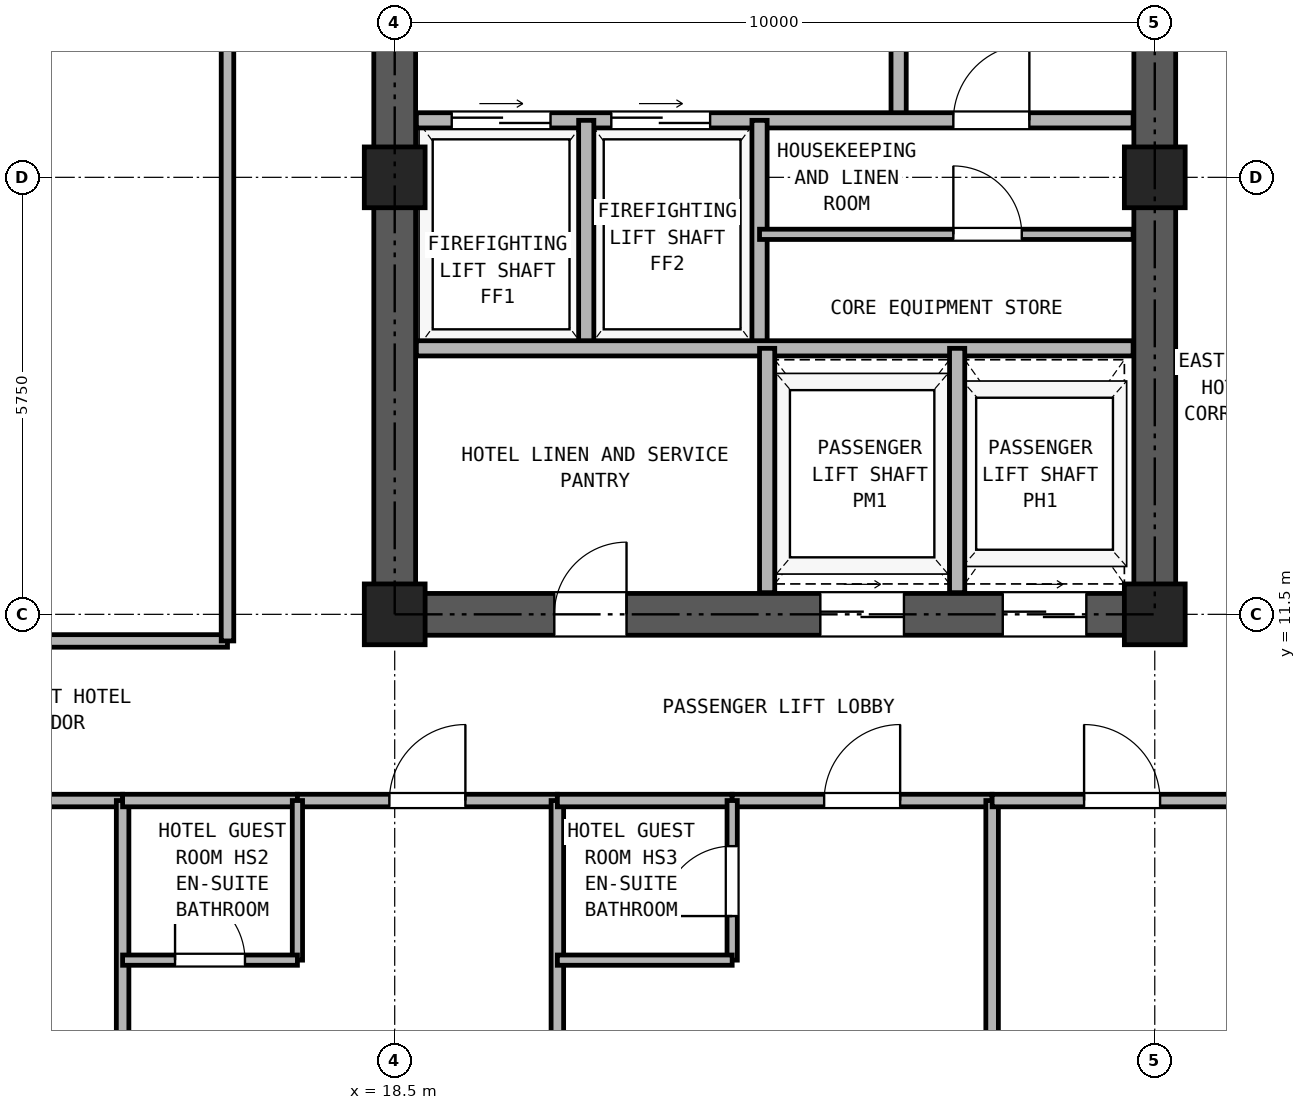
"""IFC4 building model, lengths in metres.
Left out: names, types, materials, properties, quantities, classifications, styles, units other than length and angle.
Written with IfcOpenShell. Run it as: python <this file> out.ifc"""

import sys

from ifc_helpers import new_model, si_unit, direction, frame, frame_2d, origin, origin_2d, place, context, subcontext, project, spatial, rectangle, hollow_rectangle, extrude, source, transform, mapped, element, fill, save


model = new_model("IFC4")
c1 = context("Model", 3, precision=1e-05, world=origin(), true_north=direction((0.0, 1.0)))
c2 = subcontext(c1, "Body", "Model", "MODEL_VIEW")
j1 = project(units=[si_unit("LENGTHUNIT", "METRE"), si_unit("PLANEANGLEUNIT", "RADIAN")], contexts=[c1])
p1 = place(None, origin())
s1 = spatial("IfcSite", under=j1, at=p1, CompositionType="ELEMENT")
p2 = place(p1, origin())
s2 = spatial("IfcBuilding", under=s1, at=p2, CompositionType="ELEMENT")
p3 = place(p2, frame((0.0, 0.0, 99.1)))
s3 = spatial("IfcBuildingStorey", under=s2, at=p3, CompositionType="ELEMENT", Elevation=99.1)
m1 = source(origin(), c2, "Body", "SweptSolid", [
    extrude(hollow_rectangle(XDim=0.8, YDim=0.8, WallThickness=0.045, at=origin_2d()), origin(), (0.0, 0.0, 1.0), 2.95),
])
for number, where, z_axis, x_axis in (
    (1, (18.5, 11.5, 0.0), (0.0, 0.0, 1.0), (1.0, 0.0, 0.0)),
    (2, (18.5, 17.25, 0.0), (0.0, 0.0, 1.0), (1.0, 0.0, 0.0)),
    (3, (28.5, 11.5, 0.0), (0.0, 0.0, 1.0), (1.0, 0.0, 0.0)),
    (4, (28.5, 17.25, 0.0), (0.0, 0.0, 1.0), (1.0, 0.0, 0.0)),
):
    element("IfcColumn", number, at=place(p3, frame(where, z_axis=z_axis, x_axis=x_axis)), inside=s3, PredefinedType="COLUMN", context=c2, shape_type="MappedRepresentation", body=[
        mapped(m1, transform((0.0, 0.0, 0.0), x_axis=(1.0, 0.0, 0.0), y_axis=(0.0, 1.0, 0.0), z_axis=(0.0, 0.0, 1.0), scale=1.0)),
    ])
p4 = place(p3, frame((18.225, 11.5, 0.0), z_axis=(0.0, 0.0, 1.0), x_axis=(1.0, 0.0, 0.0)))
e5 = element("IfcWall", 5, at=p4, inside=s3, PredefinedType="SHEAR", context=c2, shape_type="SweptSolid", body=[
    extrude(rectangle(XDim=10.55, YDim=0.55, at=frame_2d((5.275, 0.0))), origin(), (0.0, 0.0, 1.0), 2.95),
])
p5 = place(p4, frame((2.375, 0.0, 0.0)))
e6 = element("IfcOpeningElement", 6, at=p5, cuts=e5, PredefinedType="OPENING", context=c2, shape_type="SweptSolid", body=[
    extrude(rectangle(XDim=0.95, YDim=2.15, at=frame_2d((0.475, 1.075))), frame((0.0, 0.285, 0.0), z_axis=(0.0, -1.0, 0.0), x_axis=(1.0, 0.0, 0.0)), (0.0, 0.0, 1.0), 0.57),
])
p6 = place(p4, frame((5.875, 0.0, 0.0)))
e7 = element("IfcOpeningElement", 7, at=p6, cuts=e5, PredefinedType="OPENING", context=c2, shape_type="SweptSolid", body=[
    extrude(rectangle(XDim=1.1, YDim=2.25, at=frame_2d((0.55, 1.125))), frame((0.0, 0.285, 0.0), z_axis=(0.0, -1.0, 0.0), x_axis=(1.0, 0.0, 0.0)), (0.0, 0.0, 1.0), 0.57),
])
p7 = place(p4, frame((8.275, 0.0, 0.0)))
e8 = element("IfcOpeningElement", 8, at=p7, cuts=e5, PredefinedType="OPENING", context=c2, shape_type="SweptSolid", body=[
    extrude(rectangle(XDim=1.1, YDim=2.25, at=frame_2d((0.55, 1.125))), frame((0.0, 0.285, 0.0), z_axis=(0.0, -1.0, 0.0), x_axis=(1.0, 0.0, 0.0)), (0.0, 0.0, 1.0), 0.57),
])
p8 = place(p3, frame((18.5, 11.775, 0.0), z_axis=(0.0, 0.0, 1.0), x_axis=(0.0, 1.0, 0.0)))
e9 = element("IfcWall", 9, at=p8, inside=s3, PredefinedType="SHEAR", context=c2, shape_type="SweptSolid", body=[
    extrude(rectangle(XDim=16.7, YDim=0.55, at=frame_2d((8.35, 0.0))), origin(), (0.0, 0.0, 1.0), 2.95),
])
p9 = place(p8, frame((7.375, 0.0, 0.0)))
e10 = element("IfcOpeningElement", 10, at=p9, cuts=e9, PredefinedType="OPENING", context=c2, shape_type="SweptSolid", body=[
    extrude(rectangle(XDim=1.15, YDim=2.2, at=frame_2d((0.575, 1.1))), frame((0.0, 0.285, 0.0), z_axis=(0.0, -1.0, 0.0), x_axis=(1.0, 0.0, 0.0)), (0.0, 0.0, 1.0), 0.57),
])
p10 = place(p3, frame((28.5, 11.775, 0.0), z_axis=(0.0, 0.0, 1.0), x_axis=(0.0, 1.0, 0.0)))
e11 = element("IfcWall", 11, at=p10, inside=s3, PredefinedType="SHEAR", context=c2, shape_type="SweptSolid", body=[
    extrude(rectangle(XDim=16.7, YDim=0.55, at=frame_2d((8.35, 0.0))), origin(), (0.0, 0.0, 1.0), 2.95),
])
p11 = place(p10, frame((7.375, 0.0, 0.0)))
e12 = element("IfcOpeningElement", 12, at=p11, cuts=e11, PredefinedType="OPENING", context=c2, shape_type="SweptSolid", body=[
    extrude(rectangle(XDim=1.15, YDim=2.2, at=frame_2d((0.575, 1.1))), frame((0.0, 0.285, 0.0), z_axis=(0.0, -1.0, 0.0), x_axis=(1.0, 0.0, 0.0)), (0.0, 0.0, 1.0), 0.57),
])
p12 = place(p3, frame((25.13, 18.0, 0.0), z_axis=(0.0, 0.0, 1.0), x_axis=(0.0, 1.0, 0.0)))
e13 = element("IfcWall", 13, at=p12, inside=s3, PredefinedType="PARTITIONING", context=c2, shape_type="SweptSolid", body=[
    extrude(rectangle(XDim=3.39, YDim=0.2, at=frame_2d((1.695, 0.0))), origin(), (0.0, 0.0, 1.0), 2.95),
])
p13 = place(p12, frame((1.1, 0.0, 0.0)))
e14 = element("IfcOpeningElement", 14, at=p13, cuts=e13, PredefinedType="OPENING", context=c2, shape_type="SweptSolid", body=[
    extrude(rectangle(XDim=1.15, YDim=2.2, at=frame_2d((0.575, 1.1))), frame((0.0, 0.11, 0.0), z_axis=(0.0, -1.0, 0.0), x_axis=(1.0, 0.0, 0.0)), (0.0, 0.0, 1.0), 0.22),
])
p14 = place(p3, frame((18.785, 18.0, 0.0), z_axis=(0.0, 0.0, 1.0), x_axis=(1.0, 0.0, 0.0)))
e15 = element("IfcWall", 15, at=p14, inside=s3, PredefinedType="PARTITIONING", context=c2, shape_type="SweptSolid", body=[
    extrude(rectangle(XDim=9.43, YDim=0.2, at=frame_2d((4.715, 0.0))), origin(), (0.0, 0.0, 1.0), 2.95),
])
p15 = place(p14, frame((0.465, 0.0, 0.0)))
e16 = element("IfcOpeningElement", 16, at=p15, cuts=e15, PredefinedType="OPENING", context=c2, shape_type="SweptSolid", body=[
    extrude(rectangle(XDim=1.3, YDim=2.3, at=frame_2d((0.65, 1.15))), frame((0.0, 0.11, 0.0), z_axis=(0.0, -1.0, 0.0), x_axis=(1.0, 0.0, 0.0)), (0.0, 0.0, 1.0), 0.22),
])
p16 = place(p14, frame((2.565, 0.0, 0.0)))
e17 = element("IfcOpeningElement", 17, at=p16, cuts=e15, PredefinedType="OPENING", context=c2, shape_type="SweptSolid", body=[
    extrude(rectangle(XDim=1.3, YDim=2.3, at=frame_2d((0.65, 1.15))), frame((0.0, 0.11, 0.0), z_axis=(0.0, -1.0, 0.0), x_axis=(1.0, 0.0, 0.0)), (0.0, 0.0, 1.0), 0.22),
])
p17 = place(p14, frame((7.065, 0.0, 0.0)))
e18 = element("IfcOpeningElement", 18, at=p17, cuts=e15, PredefinedType="OPENING", context=c2, shape_type="SweptSolid", body=[
    extrude(rectangle(XDim=1.0, YDim=2.15, at=frame_2d((0.5, 1.075))), frame((0.0, 0.11, 0.0), z_axis=(0.0, -1.0, 0.0), x_axis=(1.0, 0.0, 0.0)), (0.0, 0.0, 1.0), 0.22),
])
for number, where, z_axis, x_axis in (
    (19, (21.02, 15.0, 0.0), (0.0, 0.0, 1.0), (0.0, 1.0, 0.0)),
    (20, (23.3, 15.0, 0.0), (0.0, 0.0, 1.0), (0.0, 1.0, 0.0)),
):
    element("IfcWall", number, at=place(p3, frame(where, z_axis=z_axis, x_axis=x_axis)), inside=s3, PredefinedType="PARTITIONING", context=c2, shape_type="SweptSolid", body=[
        extrude(rectangle(XDim=3.0, YDim=0.2, at=frame_2d((1.5, 0.0))), origin(), (0.0, 0.0, 1.0), 2.95),
    ])
p18 = place(p3, frame((18.785, 15.0, 0.0), z_axis=(0.0, 0.0, 1.0), x_axis=(1.0, 0.0, 0.0)))
e21 = element("IfcWall", 21, at=p18, inside=s3, PredefinedType="PARTITIONING", context=c2, shape_type="SweptSolid", body=[
    extrude(rectangle(XDim=9.43, YDim=0.2, at=frame_2d((4.715, 0.0))), origin(), (0.0, 0.0, 1.0), 2.95),
])
p19 = place(p3, frame((23.3, 16.5, 0.0), z_axis=(0.0, 0.0, 1.0), x_axis=(1.0, 0.0, 0.0)))
e22 = element("IfcWall", 22, at=p19, inside=s3, PredefinedType="PARTITIONING", context=c2, shape_type="SweptSolid", body=[
    extrude(rectangle(XDim=4.915, YDim=0.135, at=frame_2d((2.458, 0.0))), origin(), (0.0, 0.0, 1.0), 2.95),
])
p20 = place(p19, frame((2.55, 0.0, 0.0)))
e23 = element("IfcOpeningElement", 23, at=p20, cuts=e22, PredefinedType="OPENING", context=c2, shape_type="SweptSolid", body=[
    extrude(rectangle(XDim=0.9, YDim=2.05, at=frame_2d((0.45, 1.025))), frame((0.0, 0.077, 0.0), z_axis=(0.0, -1.0, 0.0), x_axis=(1.0, 0.0, 0.0)), (0.0, 0.0, 1.0), 0.155),
])
for number, where, z_axis, x_axis in (
    (24, (23.4, 11.785, 0.0), (0.0, 0.0, 1.0), (0.0, 1.0, 0.0)),
    (25, (25.9, 11.785, 0.0), (0.0, 0.0, 1.0), (0.0, 1.0, 0.0)),
):
    element("IfcWall", number, at=place(p3, frame(where, z_axis=z_axis, x_axis=x_axis)), inside=s3, PredefinedType="PARTITIONING", context=c2, shape_type="SweptSolid", body=[
        extrude(rectangle(XDim=3.215, YDim=0.2, at=frame_2d((1.607, 0.0))), origin(), (0.0, 0.0, 1.0), 2.95),
    ])
p21 = place(p3, frame((9.2, 11.15, 0.0), z_axis=(0.0, 0.0, 1.0), x_axis=(1.0, 0.0, 0.0)))
e26 = element("IfcWall", 26, at=p21, inside=s3, PredefinedType="PARTITIONING", context=c2, shape_type="SweptSolid", body=[
    extrude(rectangle(XDim=7.1, YDim=0.165, at=frame_2d((3.55, 0.0))), origin(), (0.0, 0.0, 1.0), 2.95),
])
p22 = place(p3, frame((16.3, 11.15, 0.0), z_axis=(0.0, 0.0, 1.0), x_axis=(0.0, 1.0, 0.0)))
e27 = element("IfcWall", 27, at=p22, inside=s3, PredefinedType="PARTITIONING", context=c2, shape_type="SweptSolid", body=[
    extrude(rectangle(XDim=18.6, YDim=0.165, at=frame_2d((9.3, 0.0))), origin(), (0.0, 0.0, 1.0), 2.95),
])
p23 = place(p22, frame((8.8, 0.0, 0.0)))
e28 = element("IfcOpeningElement", 28, at=p23, cuts=e27, PredefinedType="OPENING", context=c2, shape_type="SweptSolid", body=[
    extrude(rectangle(XDim=0.95, YDim=2.15, at=frame_2d((0.475, 1.075))), frame((0.0, 0.093, 0.0), z_axis=(0.0, -1.0, 0.0), x_axis=(1.0, 0.0, 0.0)), (0.0, 0.0, 1.0), 0.185),
])
p24 = place(p3, frame((11.5, 9.05, 0.0), z_axis=(0.0, 0.0, 1.0), x_axis=(1.0, 0.0, 0.0)))
e29 = element("IfcWall", 29, at=p24, inside=s3, PredefinedType="PARTITIONING", context=c2, shape_type="SweptSolid", body=[
    extrude(rectangle(XDim=3.42, YDim=0.165, at=frame_2d((1.71, 0.0))), origin(), (0.0, 0.0, 1.0), 2.95),
])
p25 = place(p24, frame((1.21, 0.0, 0.0)))
e30 = element("IfcOpeningElement", 30, at=p25, cuts=e29, PredefinedType="OPENING", context=c2, shape_type="SweptSolid", body=[
    extrude(rectangle(XDim=1.0, YDim=2.15, at=frame_2d((0.5, 1.075))), frame((0.0, 0.093, 0.0), z_axis=(0.0, -1.0, 0.0), x_axis=(1.0, 0.0, 0.0)), (0.0, 0.0, 1.0), 0.185),
])
p26 = place(p3, frame((14.92, 0.16, 0.0), z_axis=(0.0, 0.0, 1.0), x_axis=(0.0, 1.0, 0.0)))
e31 = element("IfcWall", 31, at=p26, inside=s3, PredefinedType="PARTITIONING", context=c2, shape_type="SweptSolid", body=[
    extrude(rectangle(XDim=8.89, YDim=0.165, at=frame_2d((4.445, 0.0))), origin(), (0.0, 0.0, 1.0), 2.95),
])
p27 = place(p3, frame((14.92, 9.05, 0.0), z_axis=(0.0, 0.0, 1.0), x_axis=(1.0, 0.0, 0.0)))
e32 = element("IfcWall", 32, at=p27, inside=s3, PredefinedType="PARTITIONING", context=c2, shape_type="SweptSolid", body=[
    extrude(rectangle(XDim=2.3, YDim=0.165, at=frame_2d((1.15, 0.0))), origin(), (0.0, 0.0, 1.0), 2.95),
])
p28 = place(p3, frame((17.22, 9.05, 0.0), z_axis=(0.0, 0.0, 1.0), x_axis=(1.0, 0.0, 0.0)))
e33 = element("IfcWall", 33, at=p28, inside=s3, PredefinedType="PARTITIONING", context=c2, shape_type="SweptSolid", body=[
    extrude(rectangle(XDim=3.42, YDim=0.165, at=frame_2d((1.71, 0.0))), origin(), (0.0, 0.0, 1.0), 2.95),
])
p29 = place(p28, frame((1.21, 0.0, 0.0)))
e34 = element("IfcOpeningElement", 34, at=p29, cuts=e33, PredefinedType="OPENING", context=c2, shape_type="SweptSolid", body=[
    extrude(rectangle(XDim=1.0, YDim=2.15, at=frame_2d((0.5, 1.075))), frame((0.0, 0.093, 0.0), z_axis=(0.0, -1.0, 0.0), x_axis=(1.0, 0.0, 0.0)), (0.0, 0.0, 1.0), 0.185),
])
p30 = place(p3, frame((17.22, 6.95, 0.0), z_axis=(0.0, 0.0, 1.0), x_axis=(0.0, 1.0, 0.0)))
e35 = element("IfcWall", 35, at=p30, inside=s3, PredefinedType="PARTITIONING", context=c2, shape_type="SweptSolid", body=[
    extrude(rectangle(XDim=2.1, YDim=0.135, at=frame_2d((1.05, 0.0))), origin(), (0.0, 0.0, 1.0), 2.95),
])
p31 = place(p3, frame((14.92, 6.95, 0.0), z_axis=(0.0, 0.0, 1.0), x_axis=(1.0, 0.0, 0.0)))
e36 = element("IfcWall", 36, at=p31, inside=s3, PredefinedType="PARTITIONING", context=c2, shape_type="SweptSolid", body=[
    extrude(rectangle(XDim=2.3, YDim=0.135, at=frame_2d((1.15, 0.0))), origin(), (0.0, 0.0, 1.0), 2.95),
])
p32 = place(p31, frame((0.69, 0.0, 0.0)))
e37 = element("IfcOpeningElement", 37, at=p32, cuts=e36, PredefinedType="OPENING", context=c2, shape_type="SweptSolid", body=[
    extrude(rectangle(XDim=0.92, YDim=2.1, at=frame_2d((0.46, 1.05))), frame((0.0, 0.077, 0.0), z_axis=(0.0, -1.0, 0.0), x_axis=(1.0, 0.0, 0.0)), (0.0, 0.0, 1.0), 0.155),
])
p33 = place(p3, frame((20.64, 0.16, 0.0), z_axis=(0.0, 0.0, 1.0), x_axis=(0.0, 1.0, 0.0)))
e38 = element("IfcWall", 38, at=p33, inside=s3, PredefinedType="PARTITIONING", context=c2, shape_type="SweptSolid", body=[
    extrude(rectangle(XDim=8.89, YDim=0.165, at=frame_2d((4.445, 0.0))), origin(), (0.0, 0.0, 1.0), 2.95),
])
p34 = place(p3, frame((20.64, 9.05, 0.0), z_axis=(0.0, 0.0, 1.0), x_axis=(1.0, 0.0, 0.0)))
e39 = element("IfcWall", 39, at=p34, inside=s3, PredefinedType="PARTITIONING", context=c2, shape_type="SweptSolid", body=[
    extrude(rectangle(XDim=2.3, YDim=0.165, at=frame_2d((1.15, 0.0))), origin(), (0.0, 0.0, 1.0), 2.95),
])
p35 = place(p3, frame((22.94, 9.05, 0.0), z_axis=(0.0, 0.0, 1.0), x_axis=(1.0, 0.0, 0.0)))
e40 = element("IfcWall", 40, at=p35, inside=s3, PredefinedType="PARTITIONING", context=c2, shape_type="SweptSolid", body=[
    extrude(rectangle(XDim=3.42, YDim=0.165, at=frame_2d((1.71, 0.0))), origin(), (0.0, 0.0, 1.0), 2.95),
])
p36 = place(p35, frame((1.21, 0.0, 0.0)))
e41 = element("IfcOpeningElement", 41, at=p36, cuts=e40, PredefinedType="OPENING", context=c2, shape_type="SweptSolid", body=[
    extrude(rectangle(XDim=1.0, YDim=2.15, at=frame_2d((0.5, 1.075))), frame((0.0, 0.093, 0.0), z_axis=(0.0, -1.0, 0.0), x_axis=(1.0, 0.0, 0.0)), (0.0, 0.0, 1.0), 0.185),
])
p37 = place(p3, frame((22.94, 6.95, 0.0), z_axis=(0.0, 0.0, 1.0), x_axis=(0.0, 1.0, 0.0)))
e42 = element("IfcWall", 42, at=p37, inside=s3, PredefinedType="PARTITIONING", context=c2, shape_type="SweptSolid", body=[
    extrude(rectangle(XDim=2.1, YDim=0.135, at=frame_2d((1.05, 0.0))), origin(), (0.0, 0.0, 1.0), 2.95),
])
p38 = place(p37, frame((0.58, 0.0, 0.0)))
e43 = element("IfcOpeningElement", 43, at=p38, cuts=e42, PredefinedType="OPENING", context=c2, shape_type="SweptSolid", body=[
    extrude(rectangle(XDim=0.92, YDim=2.1, at=frame_2d((0.46, 1.05))), frame((0.0, 0.077, 0.0), z_axis=(0.0, -1.0, 0.0), x_axis=(1.0, 0.0, 0.0)), (0.0, 0.0, 1.0), 0.155),
])
p39 = place(p3, frame((20.64, 6.95, 0.0), z_axis=(0.0, 0.0, 1.0), x_axis=(1.0, 0.0, 0.0)))
e44 = element("IfcWall", 44, at=p39, inside=s3, PredefinedType="PARTITIONING", context=c2, shape_type="SweptSolid", body=[
    extrude(rectangle(XDim=2.3, YDim=0.135, at=frame_2d((1.15, 0.0))), origin(), (0.0, 0.0, 1.0), 2.95),
])
p40 = place(p3, frame((26.36, 0.16, 0.0), z_axis=(0.0, 0.0, 1.0), x_axis=(0.0, 1.0, 0.0)))
e45 = element("IfcWall", 45, at=p40, inside=s3, PredefinedType="PARTITIONING", context=c2, shape_type="SweptSolid", body=[
    extrude(rectangle(XDim=8.89, YDim=0.165, at=frame_2d((4.445, 0.0))), origin(), (0.0, 0.0, 1.0), 2.95),
])
p41 = place(p3, frame((26.36, 9.05, 0.0), z_axis=(0.0, 0.0, 1.0), x_axis=(1.0, 0.0, 0.0)))
e46 = element("IfcWall", 46, at=p41, inside=s3, PredefinedType="PARTITIONING", context=c2, shape_type="SweptSolid", body=[
    extrude(rectangle(XDim=3.42, YDim=0.165, at=frame_2d((1.71, 0.0))), origin(), (0.0, 0.0, 1.0), 2.95),
])
p42 = place(p41, frame((1.21, 0.0, 0.0)))
e47 = element("IfcOpeningElement", 47, at=p42, cuts=e46, PredefinedType="OPENING", context=c2, shape_type="SweptSolid", body=[
    extrude(rectangle(XDim=1.0, YDim=2.15, at=frame_2d((0.5, 1.075))), frame((0.0, 0.093, 0.0), z_axis=(0.0, -1.0, 0.0), x_axis=(1.0, 0.0, 0.0)), (0.0, 0.0, 1.0), 0.185),
])
p43 = place(p15, origin())
e48 = element("IfcDoor", 48, at=p43, inside=s3, OperationType="DOUBLE_DOOR_SLIDING", PredefinedType="DOOR", context=c2, shape_type="SweptSolid", body=[
    extrude(rectangle(XDim=1.3, YDim=2.3, at=frame_2d((0.65, 1.15))), frame((0.0, 0.025, 0.0), z_axis=(0.0, -1.0, 0.0), x_axis=(1.0, 0.0, 0.0)), (0.0, 0.0, 1.0), 0.05),
])
fill(e16, e48)
p44 = place(p16, origin())
e49 = element("IfcDoor", 49, at=p44, inside=s3, OperationType="DOUBLE_DOOR_SLIDING", PredefinedType="DOOR", context=c2, shape_type="SweptSolid", body=[
    extrude(rectangle(XDim=1.3, YDim=2.3, at=frame_2d((0.65, 1.15))), frame((0.0, 0.025, 0.0), z_axis=(0.0, -1.0, 0.0), x_axis=(1.0, 0.0, 0.0)), (0.0, 0.0, 1.0), 0.05),
])
fill(e17, e49)
p45 = place(p17, frame((1.0, 0.0, 0.0), z_axis=(0.0, 0.0, 1.0), x_axis=(-1.0, 0.0, 0.0)))
e50 = element("IfcDoor", 50, at=p45, inside=s3, OperationType="SINGLE_SWING_RIGHT", PredefinedType="DOOR", context=c2, shape_type="SweptSolid", body=[
    extrude(rectangle(XDim=1.0, YDim=2.15, at=frame_2d((0.5, 1.075))), frame((0.0, 0.025, 0.0), z_axis=(0.0, -1.0, 0.0), x_axis=(1.0, 0.0, 0.0)), (0.0, 0.0, 1.0), 0.05),
])
fill(e18, e50)
p46 = place(p20, frame((0.9, 0.0, 0.0), z_axis=(0.0, 0.0, 1.0), x_axis=(-1.0, 0.0, 0.0)))
e51 = element("IfcDoor", 51, at=p46, inside=s3, OperationType="SINGLE_SWING_LEFT", PredefinedType="DOOR", context=c2, shape_type="SweptSolid", body=[
    extrude(rectangle(XDim=0.9, YDim=2.05, at=frame_2d((0.45, 1.025))), frame((0.0, 0.025, 0.0), z_axis=(0.0, -1.0, 0.0), x_axis=(1.0, 0.0, 0.0)), (0.0, 0.0, 1.0), 0.05),
])
fill(e23, e51)
p47 = place(p5, frame((0.95, 0.0, 0.0), z_axis=(0.0, 0.0, 1.0), x_axis=(-1.0, 0.0, 0.0)))
e52 = element("IfcDoor", 52, at=p47, inside=s3, OperationType="SINGLE_SWING_RIGHT", PredefinedType="DOOR", context=c2, shape_type="SweptSolid", body=[
    extrude(rectangle(XDim=0.95, YDim=2.15, at=frame_2d((0.475, 1.075))), frame((0.0, 0.025, 0.0), z_axis=(0.0, -1.0, 0.0), x_axis=(1.0, 0.0, 0.0)), (0.0, 0.0, 1.0), 0.05),
])
fill(e6, e52)
p48 = place(p6, frame((1.1, 0.0, 0.0), z_axis=(0.0, 0.0, 1.0), x_axis=(-1.0, 0.0, 0.0)))
e53 = element("IfcDoor", 53, at=p48, inside=s3, OperationType="DOUBLE_DOOR_SLIDING", PredefinedType="DOOR", context=c2, shape_type="SweptSolid", body=[
    extrude(rectangle(XDim=1.1, YDim=2.25, at=frame_2d((0.55, 1.125))), frame((0.0, 0.025, 0.0), z_axis=(0.0, -1.0, 0.0), x_axis=(1.0, 0.0, 0.0)), (0.0, 0.0, 1.0), 0.05),
])
fill(e7, e53)
p49 = place(p7, frame((1.1, 0.0, 0.0), z_axis=(0.0, 0.0, 1.0), x_axis=(-1.0, 0.0, 0.0)))
e54 = element("IfcDoor", 54, at=p49, inside=s3, OperationType="DOUBLE_DOOR_SLIDING", PredefinedType="DOOR", context=c2, shape_type="SweptSolid", body=[
    extrude(rectangle(XDim=1.1, YDim=2.25, at=frame_2d((0.55, 1.125))), frame((0.0, 0.025, 0.0), z_axis=(0.0, -1.0, 0.0), x_axis=(1.0, 0.0, 0.0)), (0.0, 0.0, 1.0), 0.05),
])
fill(e8, e54)
p50 = place(p32, origin())
e55 = element("IfcDoor", 55, at=p50, inside=s3, OperationType="SINGLE_SWING_LEFT", PredefinedType="DOOR", context=c2, shape_type="SweptSolid", body=[
    extrude(rectangle(XDim=0.92, YDim=2.1, at=frame_2d((0.46, 1.05))), frame((0.0, 0.025, 0.0), z_axis=(0.0, -1.0, 0.0), x_axis=(1.0, 0.0, 0.0)), (0.0, 0.0, 1.0), 0.05),
])
fill(e37, e55)
p51 = place(p29, frame((1.0, 0.0, 0.0), z_axis=(0.0, 0.0, 1.0), x_axis=(-1.0, 0.0, 0.0)))
e56 = element("IfcDoor", 56, at=p51, inside=s3, OperationType="SINGLE_SWING_RIGHT", PredefinedType="DOOR", context=c2, shape_type="SweptSolid", body=[
    extrude(rectangle(XDim=1.0, YDim=2.15, at=frame_2d((0.5, 1.075))), frame((0.0, 0.025, 0.0), z_axis=(0.0, -1.0, 0.0), x_axis=(1.0, 0.0, 0.0)), (0.0, 0.0, 1.0), 0.05),
])
fill(e34, e56)
p52 = place(p38, frame((0.92, 0.0, 0.0), z_axis=(0.0, 0.0, 1.0), x_axis=(-1.0, 0.0, 0.0)))
e57 = element("IfcDoor", 57, at=p52, inside=s3, OperationType="SINGLE_SWING_LEFT", PredefinedType="DOOR", context=c2, shape_type="SweptSolid", body=[
    extrude(rectangle(XDim=0.92, YDim=2.1, at=frame_2d((0.46, 1.05))), frame((0.0, 0.025, 0.0), z_axis=(0.0, -1.0, 0.0), x_axis=(1.0, 0.0, 0.0)), (0.0, 0.0, 1.0), 0.05),
])
fill(e43, e57)
p53 = place(p36, frame((1.0, 0.0, 0.0), z_axis=(0.0, 0.0, 1.0), x_axis=(-1.0, 0.0, 0.0)))
e58 = element("IfcDoor", 58, at=p53, inside=s3, OperationType="SINGLE_SWING_RIGHT", PredefinedType="DOOR", context=c2, shape_type="SweptSolid", body=[
    extrude(rectangle(XDim=1.0, YDim=2.15, at=frame_2d((0.5, 1.075))), frame((0.0, 0.025, 0.0), z_axis=(0.0, -1.0, 0.0), x_axis=(1.0, 0.0, 0.0)), (0.0, 0.0, 1.0), 0.05),
])
fill(e41, e58)
p54 = place(p42, frame((1.0, 0.0, 0.0), z_axis=(0.0, 0.0, 1.0), x_axis=(-1.0, 0.0, 0.0)))
e59 = element("IfcDoor", 59, at=p54, inside=s3, OperationType="SINGLE_SWING_LEFT", PredefinedType="DOOR", context=c2, shape_type="SweptSolid", body=[
    extrude(rectangle(XDim=1.0, YDim=2.15, at=frame_2d((0.5, 1.075))), frame((0.0, 0.025, 0.0), z_axis=(0.0, -1.0, 0.0), x_axis=(1.0, 0.0, 0.0)), (0.0, 0.0, 1.0), 0.05),
])
fill(e47, e59)
save(model, sys.argv[1])
